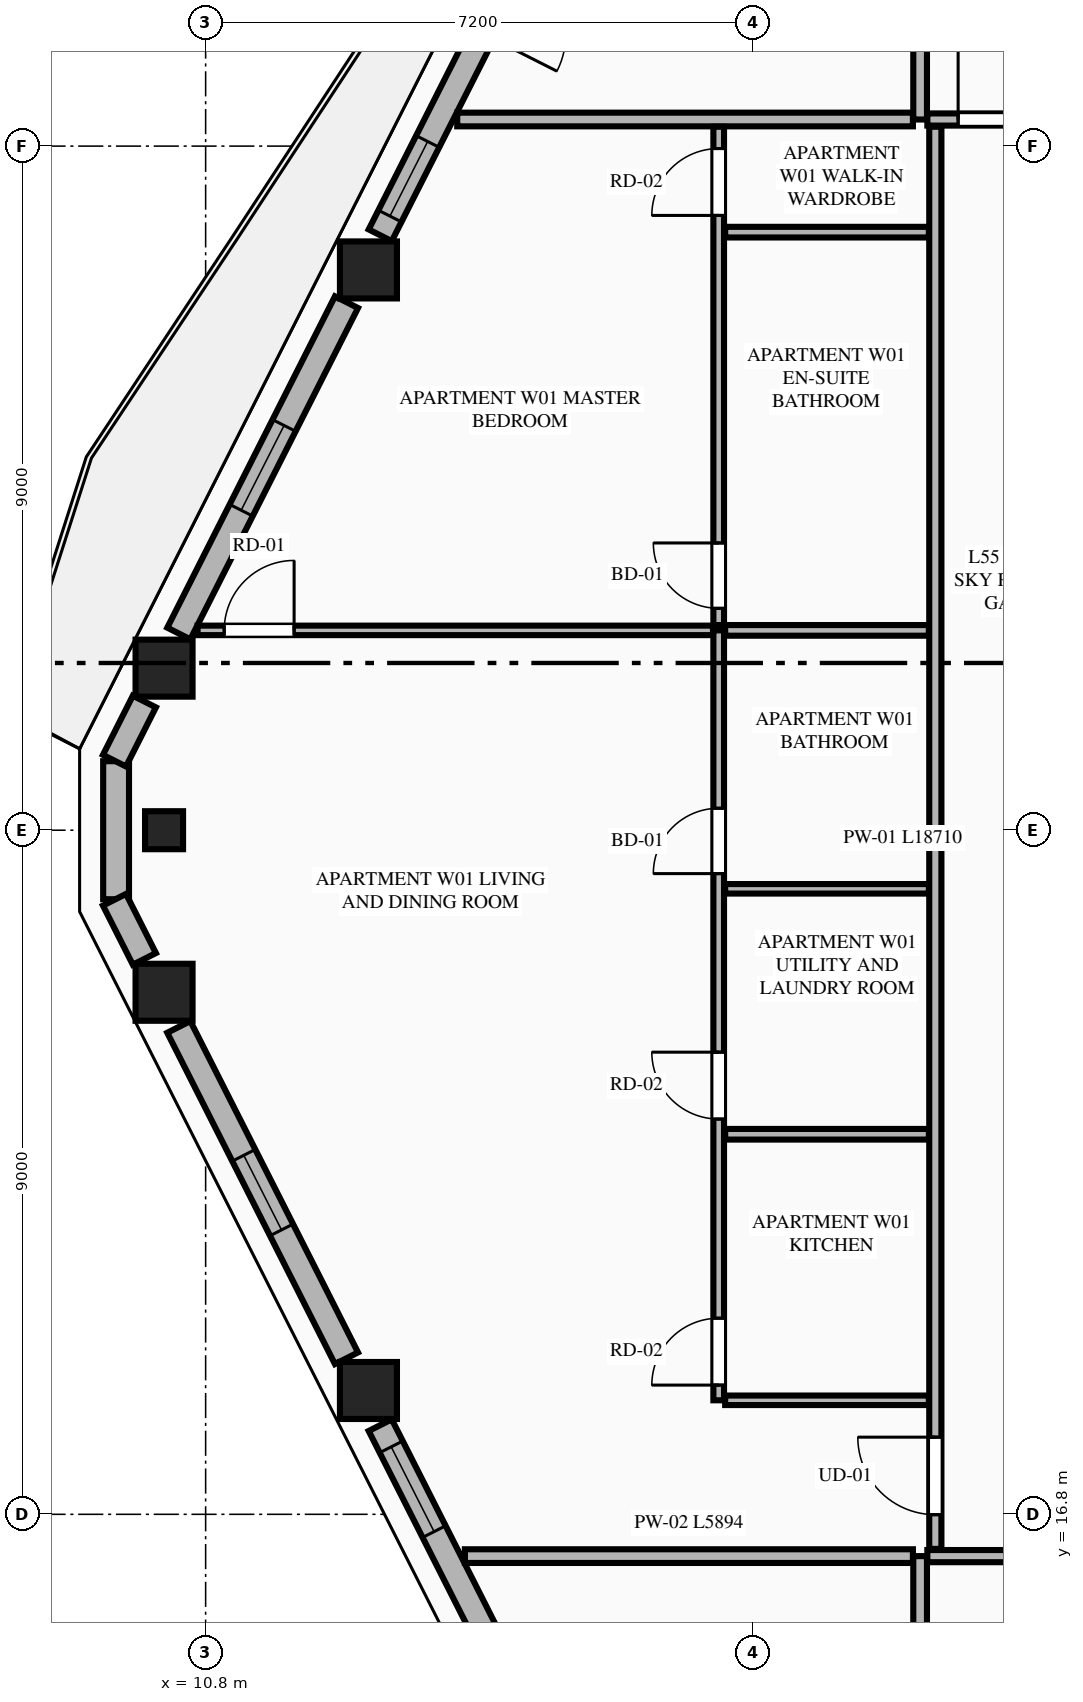
"""IFC4 building model, lengths in metres.
Left out: names, types, materials, properties, quantities, classifications, styles, units other than length and angle.
Written with IfcOpenShell. Run it as: python <this file> out.ifc"""

import sys

from ifc_helpers import new_model, si_unit, direction, frame, frame_2d, origin, origin_2d, place, context, subcontext, project, spatial, rectangle, extrude, element, fill, save


model = new_model("IFC4")
c1 = context("Model", 3, precision=1e-05, world=origin(), true_north=direction((0.0, 1.0)))
c2 = subcontext(c1, "Body", "Model", "MODEL_VIEW")
j1 = project(units=[si_unit("LENGTHUNIT", "METRE"), si_unit("PLANEANGLEUNIT", "RADIAN")], contexts=[c1])
p1 = place(None, origin())
s1 = spatial("IfcSite", under=j1, at=p1, CompositionType="ELEMENT")
p2 = place(p1, origin())
s2 = spatial("IfcBuilding", under=s1, at=p2, CompositionType="ELEMENT")
p3 = place(p2, frame((0.0, 0.0, 207.4)))
s3 = spatial("IfcBuildingStorey", under=s2, at=p3, CompositionType="ELEMENT", Elevation=207.4)
for number, where, z_axis, x_axis in (
    (1, (12.942, 33.171, 0.0), (0.0, 0.0, 1.0), (1.0, 0.0, 0.0)),
    (2, (10.253, 27.932, 0.0), (0.0, 0.0, 1.0), (1.0, 0.0, 0.0)),
    (3, (10.253, 23.668, 0.0), (0.0, 0.0, 1.0), (1.0, 0.0, 0.0)),
    (4, (12.942, 18.429, 0.0), (0.0, 0.0, 1.0), (1.0, 0.0, 0.0)),
):
    element("IfcColumn", number, at=place(p3, frame(where, z_axis=z_axis, x_axis=x_axis)), inside=s3, PredefinedType="COLUMN", context=c2, shape_type="SweptSolid", body=[
        extrude(rectangle(XDim=0.75, YDim=0.75, at=origin_2d()), origin(), (0.0, 0.0, 1.0), 3.55),
    ])
p4 = place(p3, frame((10.253, 25.8, 0.0), z_axis=(0.0, 0.0, 1.0), x_axis=(0.0, -1.0, 0.0)))
e5 = element("IfcColumn", 5, at=p4, inside=s3, PredefinedType="PILASTER", context=c2, shape_type="SweptSolid", body=[
    extrude(rectangle(XDim=0.5, YDim=0.35, at=origin_2d()), origin(), (0.0, 0.0, 1.0), 3.55),
])
p5 = place(p3, frame((9.622, 26.708, 0.0), z_axis=(0.0, 0.0, 1.0), x_axis=(0.0, -1.0, 0.0)))
e6 = element("IfcWall", 6, at=p5, inside=s3, PredefinedType="STANDARD", context=c2, shape_type="SweptSolid", body=[
    extrude(rectangle(XDim=1.816, YDim=0.34, at=frame_2d((0.908, 0.0))), origin(), (0.0, 0.0, 1.0), 3.35),
])
p6 = place(p3, frame((15.397, 38.173, 0.0), z_axis=(0.0, 0.0, 1.0), x_axis=(-0.451444616922, -0.892299141461, 0.0)))
e7 = element("IfcWall", 7, at=p6, inside=s3, PredefinedType="STANDARD", context=c2, shape_type="SweptSolid", body=[
    extrude(rectangle(XDim=5.095, YDim=0.34, at=frame_2d((2.547, 0.0))), origin(), (0.0, 0.0, 1.0), 2.883),
])
p7 = place(p6, frame((1.019, 0.0, 0.0)))
e8 = element("IfcOpeningElement", 8, at=p7, cuts=e7, PredefinedType="OPENING", context=c2, shape_type="SweptSolid", body=[
    extrude(rectangle(XDim=1.1, YDim=2.25, at=frame_2d((0.55, 1.125))), frame((0.0, 0.18, 0.0), z_axis=(0.0, -1.0, 0.0), x_axis=(1.0, 0.0, 0.0)), (0.0, 0.0, 1.0), 0.36),
])
p8 = place(p6, frame((3.712, 0.0, 0.75)))
e9 = element("IfcOpeningElement", 9, at=p8, cuts=e7, PredefinedType="OPENING", context=c2, shape_type="SweptSolid", body=[
    extrude(rectangle(XDim=1.1, YDim=1.983, at=frame_2d((0.55, 0.991))), frame((0.0, 0.18, 0.0), z_axis=(0.0, -1.0, 0.0), x_axis=(1.0, 0.0, 0.0)), (0.0, 0.0, 1.0), 0.36),
])
p9 = place(p3, frame((12.653, 32.747, 0.0), z_axis=(0.0, 0.0, 1.0), x_axis=(-0.451545895749, -0.892247893824, 0.0)))
e10 = element("IfcWall", 10, at=p9, inside=s3, PredefinedType="STANDARD", context=c2, shape_type="SweptSolid", body=[
    extrude(rectangle(XDim=4.885, YDim=0.34, at=frame_2d((2.443, 0.0))), origin(), (0.0, 0.0, 1.0), 2.883),
])
p10 = place(p9, frame((1.818, 0.0, 0.75)))
e11 = element("IfcOpeningElement", 11, at=p10, cuts=e10, PredefinedType="OPENING", context=c2, shape_type="SweptSolid", body=[
    extrude(rectangle(XDim=1.25, YDim=1.95, at=frame_2d((0.625, 0.975))), frame((0.0, 0.18, 0.0), z_axis=(0.0, -1.0, 0.0), x_axis=(1.0, 0.0, 0.0)), (0.0, 0.0, 1.0), 0.36),
])
p11 = place(p3, frame((9.994, 27.493, 0.0), z_axis=(0.0, 0.0, 1.0), x_axis=(-0.450796198004, -0.892626902947, 0.0)))
e12 = element("IfcWall", 12, at=p11, inside=s3, PredefinedType="STANDARD", context=c2, shape_type="SweptSolid", body=[
    extrude(rectangle(XDim=0.871, YDim=0.34, at=frame_2d((0.436, 0.0))), origin(), (0.0, 0.0, 1.0), 3.35),
])
p12 = place(p3, frame((9.601, 24.885, 0.0), z_axis=(0.0, 0.0, 1.0), x_axis=(0.450683483537, -0.892683817299, 0.0)))
e13 = element("IfcWall", 13, at=p12, inside=s3, PredefinedType="STANDARD", context=c2, shape_type="SweptSolid", body=[
    extrude(rectangle(XDim=0.872, YDim=0.34, at=frame_2d((0.436, 0.0))), origin(), (0.0, 0.0, 1.0), 3.35),
])
p13 = place(p3, frame((10.447, 23.212, 0.0), z_axis=(0.0, 0.0, 1.0), x_axis=(0.451566029745, -0.892237704191, 0.0)))
e14 = element("IfcWall", 14, at=p13, inside=s3, PredefinedType="STANDARD", context=c2, shape_type="SweptSolid", body=[
    extrude(rectangle(XDim=4.885, YDim=0.34, at=frame_2d((2.443, 0.0))), origin(), (0.0, 0.0, 1.0), 2.883),
])
p14 = place(p13, frame((1.893, 0.0, 0.75)))
e15 = element("IfcOpeningElement", 15, at=p14, cuts=e14, PredefinedType="OPENING", context=c2, shape_type="SweptSolid", body=[
    extrude(rectangle(XDim=1.1, YDim=1.983, at=frame_2d((0.55, 0.991))), frame((0.0, 0.18, 0.0), z_axis=(0.0, -1.0, 0.0), x_axis=(1.0, 0.0, 0.0)), (0.0, 0.0, 1.0), 0.36),
])
p15 = place(p3, frame((13.097, 17.973, 0.0), z_axis=(0.0, 0.0, 1.0), x_axis=(0.451463920536, -0.892289374841, 0.0)))
e16 = element("IfcWall", 16, at=p15, inside=s3, PredefinedType="STANDARD", context=c2, shape_type="SweptSolid", body=[
    extrude(rectangle(XDim=5.095, YDim=0.34, at=frame_2d((2.547, 0.0))), origin(), (0.0, 0.0, 1.0), 2.883),
])
p16 = place(p15, frame((0.32, 0.0, 0.75)))
e17 = element("IfcOpeningElement", 17, at=p16, cuts=e16, PredefinedType="OPENING", context=c2, shape_type="SweptSolid", body=[
    extrude(rectangle(XDim=1.25, YDim=1.95, at=frame_2d((0.625, 0.975))), frame((0.0, 0.18, 0.0), z_axis=(0.0, -1.0, 0.0), x_axis=(1.0, 0.0, 0.0)), (0.0, 0.0, 1.0), 0.36),
])
p17 = place(p15, frame((3.093, 0.0, 0.75)))
e18 = element("IfcOpeningElement", 18, at=p17, cuts=e16, PredefinedType="OPENING", context=c2, shape_type="SweptSolid", body=[
    extrude(rectangle(XDim=1.1, YDim=1.983, at=frame_2d((0.55, 0.991))), frame((0.0, 0.18, 0.0), z_axis=(0.0, -1.0, 0.0), x_axis=(1.0, 0.0, 0.0)), (0.0, 0.0, 1.0), 0.36),
])
p18 = place(p3, frame((20.2, 5.968, 0.0), z_axis=(0.0, 0.0, 1.0), x_axis=(0.0, 1.0, 0.0)))
e19 = element("IfcWall", 19, at=p18, inside=s3, PredefinedType="PARTITIONING", context=c2, shape_type="SweptSolid", body=[
    extrude(rectangle(XDim=10.282, YDim=0.18, at=frame_2d((5.141, 0.0))), origin(), (0.0, 0.0, 1.0), 3.35),
])
p19 = place(p3, frame((20.295, 16.25, 0.0), z_axis=(0.0, 0.0, 1.0), x_axis=(1.0, 0.0, 0.0)))
e20 = element("IfcWall", 20, at=p19, inside=s3, PredefinedType="PARTITIONING", context=c2, shape_type="SweptSolid", body=[
    extrude(rectangle(XDim=24.21, YDim=0.16, at=frame_2d((12.105, 0.0))), origin(), (0.0, 0.0, 1.0), 3.35),
])
p20 = place(p19, frame((22.005, 0.0, 0.0)))
e21 = element("IfcOpeningElement", 21, at=p20, cuts=e20, PredefinedType="OPENING", context=c2, shape_type="SweptSolid", body=[
    extrude(rectangle(XDim=1.02, YDim=2.25, at=frame_2d((0.51, 1.125))), frame((0.0, 0.09, 0.0), z_axis=(0.0, -1.0, 0.0), x_axis=(1.0, 0.0, 0.0)), (0.0, 0.0, 1.0), 0.18),
])
p21 = place(p3, frame((20.2, 35.15, 0.0), z_axis=(0.0, 0.0, 1.0), x_axis=(0.0, 1.0, 0.0)))
e22 = element("IfcWall", 22, at=p21, inside=s3, PredefinedType="PARTITIONING", context=c2, shape_type="SweptSolid", body=[
    extrude(rectangle(XDim=10.482, YDim=0.18, at=frame_2d((5.241, 0.0))), origin(), (0.0, 0.0, 1.0), 3.35),
])
p22 = place(p3, frame((20.295, 35.15, 0.0), z_axis=(0.0, 0.0, 1.0), x_axis=(1.0, 0.0, 0.0)))
e23 = element("IfcWall", 23, at=p22, inside=s3, PredefinedType="PARTITIONING", context=c2, shape_type="SweptSolid", body=[
    extrude(rectangle(XDim=24.21, YDim=0.16, at=frame_2d((12.105, 0.0))), origin(), (0.0, 0.0, 1.0), 3.35),
])
p23 = place(p22, frame((0.405, 0.0, 0.0)))
e24 = element("IfcOpeningElement", 24, at=p23, cuts=e23, PredefinedType="OPENING", context=c2, shape_type="SweptSolid", body=[
    extrude(rectangle(XDim=1.35, YDim=2.35, at=frame_2d((0.675, 1.175))), frame((0.0, 0.09, 0.0), z_axis=(0.0, -1.0, 0.0), x_axis=(1.0, 0.0, 0.0)), (0.0, 0.0, 1.0), 0.18),
])
p24 = place(p3, frame((14.211, 16.25, 0.0), z_axis=(0.0, 0.0, 1.0), x_axis=(1.0, 0.0, 0.0)))
e25 = element("IfcWall", 25, at=p24, inside=s3, PredefinedType="PARTITIONING", context=c2, shape_type="SweptSolid", body=[
    extrude(rectangle(XDim=5.894, YDim=0.18, at=frame_2d((2.947, 0.0))), origin(), (0.0, 0.0, 1.0), 3.35),
])
p25 = place(p3, frame((14.11, 35.15, 0.0), z_axis=(0.0, 0.0, 1.0), x_axis=(1.0, 0.0, 0.0)))
e26 = element("IfcWall", 26, at=p25, inside=s3, PredefinedType="PARTITIONING", context=c2, shape_type="SweptSolid", body=[
    extrude(rectangle(XDim=5.995, YDim=0.18, at=frame_2d((2.998, 0.0))), origin(), (0.0, 0.0, 1.0), 3.35),
])
p26 = place(p3, frame((20.4, 16.345, 0.0), z_axis=(0.0, 0.0, 1.0), x_axis=(0.0, 1.0, 0.0)))
e27 = element("IfcWall", 27, at=p26, inside=s3, PredefinedType="PARTITIONING", context=c2, shape_type="SweptSolid", body=[
    extrude(rectangle(XDim=18.71, YDim=0.16, at=frame_2d((9.355, 0.0))), origin(), (0.0, 0.0, 1.0), 3.35),
])
p27 = place(p26, frame((0.45, 0.0, 0.0)))
e28 = element("IfcOpeningElement", 28, at=p27, cuts=e27, PredefinedType="OPENING", context=c2, shape_type="SweptSolid", body=[
    extrude(rectangle(XDim=1.02, YDim=2.25, at=frame_2d((0.51, 1.125))), frame((0.0, 0.09, 0.0), z_axis=(0.0, -1.0, 0.0), x_axis=(1.0, 0.0, 0.0)), (0.0, 0.0, 1.0), 0.18),
])
p28 = place(p3, frame((17.635, 18.3, 0.0), z_axis=(0.0, 0.0, 1.0), x_axis=(1.0, 0.0, 0.0)))
e29 = element("IfcWall", 29, at=p28, inside=s3, PredefinedType="PARTITIONING", context=c2, shape_type="SweptSolid", body=[
    extrude(rectangle(XDim=2.68, YDim=0.125, at=frame_2d((1.34, 0.0))), origin(), (0.0, 0.0, 1.0), 2.807),
])
p29 = place(p3, frame((17.55, 18.3, 0.0), z_axis=(0.0, 0.0, 1.0), x_axis=(0.0, 1.0, 0.0)))
e30 = element("IfcWall", 30, at=p29, inside=s3, PredefinedType="PLUMBINGWALL", context=c2, shape_type="SweptSolid", body=[
    extrude(rectangle(XDim=10.129, YDim=0.14, at=frame_2d((5.064, 0.0))), origin(), (0.0, 0.0, 1.0), 3.35),
])
p30 = place(p29, frame((0.2, 0.0, 0.0)))
e31 = element("IfcOpeningElement", 31, at=p30, cuts=e30, PredefinedType="OPENING", context=c2, shape_type="SweptSolid", body=[
    extrude(rectangle(XDim=0.88, YDim=2.15, at=frame_2d((0.44, 1.075))), frame((0.0, 0.08, 0.0), z_axis=(0.0, -1.0, 0.0), x_axis=(1.0, 0.0, 0.0)), (0.0, 0.0, 1.0), 0.16),
])
p31 = place(p29, frame((3.7, 0.0, 0.0)))
e32 = element("IfcOpeningElement", 32, at=p31, cuts=e30, PredefinedType="OPENING", context=c2, shape_type="SweptSolid", body=[
    extrude(rectangle(XDim=0.88, YDim=2.15, at=frame_2d((0.44, 1.075))), frame((0.0, 0.08, 0.0), z_axis=(0.0, -1.0, 0.0), x_axis=(1.0, 0.0, 0.0)), (0.0, 0.0, 1.0), 0.16),
])
p32 = place(p29, frame((6.929, 0.0, 0.0)))
e33 = element("IfcOpeningElement", 33, at=p32, cuts=e30, PredefinedType="OPENING", context=c2, shape_type="SweptSolid", body=[
    extrude(rectangle(XDim=0.86, YDim=2.1, at=frame_2d((0.43, 1.05))), frame((0.0, 0.08, 0.0), z_axis=(0.0, -1.0, 0.0), x_axis=(1.0, 0.0, 0.0)), (0.0, 0.0, 1.0), 0.16),
])
p33 = place(p3, frame((17.55, 28.499, 0.0), z_axis=(0.0, 0.0, 1.0), x_axis=(0.0, 1.0, 0.0)))
e34 = element("IfcWall", 34, at=p33, inside=s3, PredefinedType="PLUMBINGWALL", context=c2, shape_type="SweptSolid", body=[
    extrude(rectangle(XDim=6.556, YDim=0.14, at=frame_2d((3.278, 0.0))), origin(), (0.0, 0.0, 1.0), 3.35),
])
p34 = place(p33, frame((0.22, 0.0, 0.0)))
e35 = element("IfcOpeningElement", 35, at=p34, cuts=e34, PredefinedType="OPENING", context=c2, shape_type="SweptSolid", body=[
    extrude(rectangle(XDim=0.86, YDim=2.1, at=frame_2d((0.43, 1.05))), frame((0.0, 0.08, 0.0), z_axis=(0.0, -1.0, 0.0), x_axis=(1.0, 0.0, 0.0)), (0.0, 0.0, 1.0), 0.16),
])
p35 = place(p33, frame((5.389, 0.0, 0.0)))
e36 = element("IfcOpeningElement", 36, at=p35, cuts=e34, PredefinedType="OPENING", context=c2, shape_type="SweptSolid", body=[
    extrude(rectangle(XDim=0.88, YDim=2.15, at=frame_2d((0.44, 1.075))), frame((0.0, 0.08, 0.0), z_axis=(0.0, -1.0, 0.0), x_axis=(1.0, 0.0, 0.0)), (0.0, 0.0, 1.0), 0.16),
])
p36 = place(p3, frame((17.635, 28.429, 0.0), z_axis=(0.0, 0.0, 1.0), x_axis=(1.0, 0.0, 0.0)))
e37 = element("IfcWall", 37, at=p36, inside=s3, PredefinedType="PLUMBINGWALL", context=c2, shape_type="SweptSolid", body=[
    extrude(rectangle(XDim=2.68, YDim=0.14, at=frame_2d((1.34, 0.0))), origin(), (0.0, 0.0, 1.0), 3.35),
])
p37 = place(p3, frame((10.694, 28.429, 0.0), z_axis=(0.0, 0.0, 1.0), x_axis=(1.0, 0.0, 0.0)))
e38 = element("IfcWall", 38, at=p37, inside=s3, PredefinedType="PARTITIONING", context=c2, shape_type="SweptSolid", body=[
    extrude(rectangle(XDim=6.781, YDim=0.125, at=frame_2d((3.391, 0.0))), origin(), (0.0, 0.0, 1.0), 3.35),
])
p38 = place(p37, frame((0.35, 0.0, 0.0)))
e39 = element("IfcOpeningElement", 39, at=p38, cuts=e38, PredefinedType="OPENING", context=c2, shape_type="SweptSolid", body=[
    extrude(rectangle(XDim=0.92, YDim=2.15, at=frame_2d((0.46, 1.075))), frame((0.0, 0.073, 0.0), z_axis=(0.0, -1.0, 0.0), x_axis=(1.0, 0.0, 0.0)), (0.0, 0.0, 1.0), 0.145),
])
p39 = place(p3, frame((17.635, 21.8, 0.0), z_axis=(0.0, 0.0, 1.0), x_axis=(1.0, 0.0, 0.0)))
e40 = element("IfcWall", 40, at=p39, inside=s3, PredefinedType="PLUMBINGWALL", context=c2, shape_type="SweptSolid", body=[
    extrude(rectangle(XDim=2.68, YDim=0.14, at=frame_2d((1.34, 0.0))), origin(), (0.0, 0.0, 1.0), 3.35),
])
p40 = place(p3, frame((17.635, 25.029, 0.0), z_axis=(0.0, 0.0, 1.0), x_axis=(1.0, 0.0, 0.0)))
e41 = element("IfcWall", 41, at=p40, inside=s3, PredefinedType="PARTITIONING", context=c2, shape_type="SweptSolid", body=[
    extrude(rectangle(XDim=2.68, YDim=0.125, at=frame_2d((1.34, 0.0))), origin(), (0.0, 0.0, 1.0), 3.35),
])
p41 = place(p3, frame((17.635, 33.668, 0.0), z_axis=(0.0, 0.0, 1.0), x_axis=(1.0, 0.0, 0.0)))
e42 = element("IfcWall", 42, at=p41, inside=s3, PredefinedType="PLUMBINGWALL", context=c2, shape_type="SweptSolid", body=[
    extrude(rectangle(XDim=2.68, YDim=0.14, at=frame_2d((1.34, 0.0))), origin(), (0.0, 0.0, 1.0), 3.35),
])
p42 = place(p10, origin())
e43 = element("IfcWindow", 43, at=p42, inside=s3, PartitioningType="SINGLE_PANEL", PredefinedType="WINDOW", context=c2, shape_type="SweptSolid", body=[
    extrude(rectangle(XDim=1.25, YDim=1.95, at=frame_2d((0.625, 0.975))), frame((0.0, 0.03, 0.0), z_axis=(0.0, -1.0, 0.0), x_axis=(1.0, 0.0, 0.0)), (0.0, 0.0, 1.0), 0.06),
])
fill(e11, e43)
p43 = place(p14, origin())
e44 = element("IfcWindow", 44, at=p43, inside=s3, PartitioningType="SINGLE_PANEL", PredefinedType="WINDOW", context=c2, shape_type="SweptSolid", body=[
    extrude(rectangle(XDim=1.1, YDim=1.983, at=frame_2d((0.55, 0.991))), frame((0.0, 0.03, 0.0), z_axis=(0.0, -1.0, 0.0), x_axis=(1.0, 0.0, 0.0)), (0.0, 0.0, 1.0), 0.06),
])
fill(e15, e44)
p44 = place(p16, origin())
e45 = element("IfcWindow", 45, at=p44, inside=s3, PartitioningType="SINGLE_PANEL", PredefinedType="WINDOW", context=c2, shape_type="SweptSolid", body=[
    extrude(rectangle(XDim=1.25, YDim=1.95, at=frame_2d((0.625, 0.975))), frame((0.0, 0.03, 0.0), z_axis=(0.0, -1.0, 0.0), x_axis=(1.0, 0.0, 0.0)), (0.0, 0.0, 1.0), 0.06),
])
fill(e17, e45)
p45 = place(p23, origin())
e46 = element("IfcDoor", 46, at=p45, inside=s3, OperationType="SINGLE_SWING_LEFT", PredefinedType="DOOR", context=c2, shape_type="SweptSolid", body=[
    extrude(rectangle(XDim=1.35, YDim=2.35, at=frame_2d((0.675, 1.175))), frame((0.0, 0.025, 0.0), z_axis=(0.0, -1.0, 0.0), x_axis=(1.0, 0.0, 0.0)), (0.0, 0.0, 1.0), 0.05),
])
fill(e24, e46)
p46 = place(p30, origin())
e47 = element("IfcDoor", 47, at=p46, inside=s3, OperationType="SINGLE_SWING_LEFT", PredefinedType="DOOR", context=c2, shape_type="SweptSolid", body=[
    extrude(rectangle(XDim=0.88, YDim=2.15, at=frame_2d((0.44, 1.075))), frame((0.0, 0.025, 0.0), z_axis=(0.0, -1.0, 0.0), x_axis=(1.0, 0.0, 0.0)), (0.0, 0.0, 1.0), 0.05),
])
fill(e31, e47)
p47 = place(p31, origin())
e48 = element("IfcDoor", 48, at=p47, inside=s3, OperationType="SINGLE_SWING_RIGHT", PredefinedType="DOOR", context=c2, shape_type="SweptSolid", body=[
    extrude(rectangle(XDim=0.88, YDim=2.15, at=frame_2d((0.44, 1.075))), frame((0.0, 0.025, 0.0), z_axis=(0.0, -1.0, 0.0), x_axis=(1.0, 0.0, 0.0)), (0.0, 0.0, 1.0), 0.05),
])
fill(e32, e48)
p48 = place(p32, origin())
e49 = element("IfcDoor", 49, at=p48, inside=s3, OperationType="SINGLE_SWING_LEFT", PredefinedType="DOOR", context=c2, shape_type="SweptSolid", body=[
    extrude(rectangle(XDim=0.86, YDim=2.1, at=frame_2d((0.43, 1.05))), frame((0.0, 0.025, 0.0), z_axis=(0.0, -1.0, 0.0), x_axis=(1.0, 0.0, 0.0)), (0.0, 0.0, 1.0), 0.05),
])
fill(e33, e49)
p49 = place(p34, origin())
e50 = element("IfcDoor", 50, at=p49, inside=s3, OperationType="SINGLE_SWING_RIGHT", PredefinedType="DOOR", context=c2, shape_type="SweptSolid", body=[
    extrude(rectangle(XDim=0.86, YDim=2.1, at=frame_2d((0.43, 1.05))), frame((0.0, 0.025, 0.0), z_axis=(0.0, -1.0, 0.0), x_axis=(1.0, 0.0, 0.0)), (0.0, 0.0, 1.0), 0.05),
])
fill(e35, e50)
p50 = place(p35, origin())
e51 = element("IfcDoor", 51, at=p50, inside=s3, OperationType="SINGLE_SWING_LEFT", PredefinedType="DOOR", context=c2, shape_type="SweptSolid", body=[
    extrude(rectangle(XDim=0.88, YDim=2.15, at=frame_2d((0.44, 1.075))), frame((0.0, 0.025, 0.0), z_axis=(0.0, -1.0, 0.0), x_axis=(1.0, 0.0, 0.0)), (0.0, 0.0, 1.0), 0.05),
])
fill(e36, e51)
p51 = place(p27, origin())
e52 = element("IfcDoor", 52, at=p51, inside=s3, OperationType="SINGLE_SWING_RIGHT", PredefinedType="DOOR", context=c2, shape_type="SweptSolid", body=[
    extrude(rectangle(XDim=1.02, YDim=2.25, at=frame_2d((0.51, 1.125))), frame((0.0, 0.025, 0.0), z_axis=(0.0, -1.0, 0.0), x_axis=(1.0, 0.0, 0.0)), (0.0, 0.0, 1.0), 0.05),
])
fill(e28, e52)
p52 = place(p38, origin())
e53 = element("IfcDoor", 53, at=p52, inside=s3, OperationType="SINGLE_SWING_RIGHT", PredefinedType="DOOR", context=c2, shape_type="SweptSolid", body=[
    extrude(rectangle(XDim=0.92, YDim=2.15, at=frame_2d((0.46, 1.075))), frame((0.0, 0.025, 0.0), z_axis=(0.0, -1.0, 0.0), x_axis=(1.0, 0.0, 0.0)), (0.0, 0.0, 1.0), 0.05),
])
fill(e39, e53)
p53 = place(p8, origin())
e54 = element("IfcWindow", 54, at=p53, inside=s3, PartitioningType="SINGLE_PANEL", PredefinedType="WINDOW", context=c2, shape_type="SweptSolid", body=[
    extrude(rectangle(XDim=1.1, YDim=1.983, at=frame_2d((0.55, 0.991))), frame((0.0, 0.03, 0.0), z_axis=(0.0, -1.0, 0.0), x_axis=(1.0, 0.0, 0.0)), (0.0, 0.0, 1.0), 0.06),
])
fill(e9, e54)
save(model, sys.argv[1])
